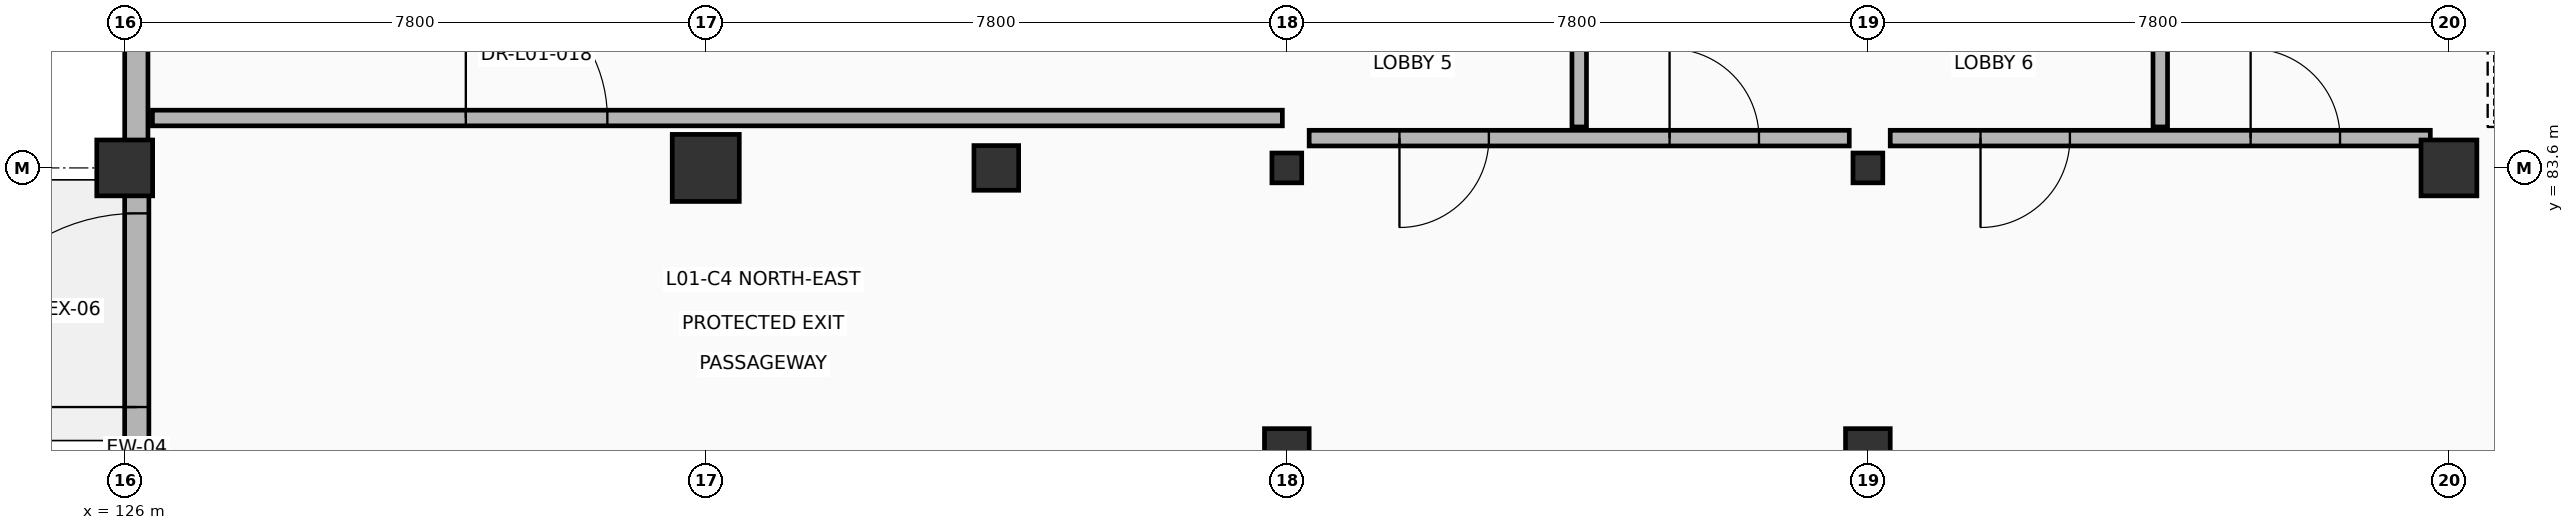
"""IFC4 building model, lengths in metres.
Left out: names, types, materials, properties, quantities, classifications, styles, units other than length and angle.
Written with IfcOpenShell. Run it as: python <this file> out.ifc"""

import sys

from ifc_helpers import new_model, si_unit, direction, frame, frame_2d, origin, origin_2d, place, context, subcontext, project, spatial, rectangle, hollow_rectangle, circle, extrude, element, fill, save


model = new_model("IFC4")
c1 = context("Model", 3, precision=1e-05, world=origin(), true_north=direction((0.0, 1.0)))
c2 = subcontext(c1, "Body", "Model", "MODEL_VIEW")
j1 = project(units=[si_unit("LENGTHUNIT", "METRE"), si_unit("PLANEANGLEUNIT", "RADIAN")], contexts=[c1])
p1 = place(None, origin())
s1 = spatial("IfcSite", under=j1, at=p1, CompositionType="ELEMENT")
p2 = place(p1, origin())
s2 = spatial("IfcBuilding", under=s1, at=p2, CompositionType="ELEMENT")
p3 = place(p2, origin())
s3 = spatial("IfcBuildingStorey", under=s2, at=p3, CompositionType="ELEMENT", Elevation=0.0)
p4 = place(p3, frame((126.0, 83.6, 0.0), z_axis=(0.0, 0.0, 1.0), x_axis=(1.0, 0.0, 0.0)))
e1 = element("IfcColumn", 1, at=p4, inside=s3, PredefinedType="COLUMN", context=c2, shape_type="SweptSolid", body=[
    extrude(circle(Radius=0.375, at=origin_2d()), origin(), (0.0, 0.0, 1.0), 5.1),
])
p5 = place(p3, frame((133.8, 83.6, 0.0), z_axis=(0.0, 0.0, 1.0), x_axis=(1.0, 0.0, 0.0)))
e2 = element("IfcColumn", 2, at=p5, inside=s3, PredefinedType="COLUMN", context=c2, shape_type="SweptSolid", body=[
    extrude(rectangle(XDim=0.9, YDim=0.9, at=origin_2d()), origin(), (0.0, 0.0, 1.0), 5.4),
])
for number, where, z_axis, x_axis in (
    (3, (141.6, 83.6, 0.0), (0.0, 0.0, 1.0), (1.0, 0.0, 0.0)),
    (4, (149.4, 83.6, 0.0), (0.0, 0.0, 1.0), (1.0, 0.0, 0.0)),
):
    element("IfcColumn", number, at=place(p3, frame(where, z_axis=z_axis, x_axis=x_axis)), inside=s3, PredefinedType="COLUMN", context=c2, shape_type="SweptSolid", body=[
        extrude(hollow_rectangle(XDim=0.4, YDim=0.4, WallThickness=0.016, at=origin_2d()), origin(), (0.0, 0.0, 1.0), 5.4),
    ])
p6 = place(p3, frame((157.2, 83.6, 0.0), z_axis=(0.0, 0.0, 1.0), x_axis=(1.0, 0.0, 0.0)))
e5 = element("IfcColumn", 5, at=p6, inside=s3, PredefinedType="COLUMN", context=c2, shape_type="SweptSolid", body=[
    extrude(circle(Radius=0.375, at=origin_2d()), origin(), (0.0, 0.0, 1.0), 5.4),
])
for number, where, z_axis, x_axis in (
    (6, (137.7, 83.6, 0.0), (0.0, 0.0, 1.0), (1.0, 0.0, 0.0)),
    (7, (141.6, 79.8, 0.0), (0.0, 0.0, 1.0), (1.0, 0.0, 0.0)),
    (8, (149.4, 79.8, 0.0), (0.0, 0.0, 1.0), (1.0, 0.0, 0.0)),
):
    element("IfcColumn", number, at=place(p3, frame(where, z_axis=z_axis, x_axis=x_axis)), inside=s3, PredefinedType="COLUMN", context=c2, shape_type="SweptSolid", body=[
        extrude(rectangle(XDim=0.6, YDim=0.6, at=origin_2d()), origin(), (0.0, 0.0, 1.0), 5.4),
    ])
p7 = place(p3, frame((126.162, 76.435, 0.0), z_axis=(0.0, 0.0, 1.0), x_axis=(0.0, 1.0, 0.0)))
e9 = element("IfcWall", 9, at=p7, inside=s3, PredefinedType="SOLIDWALL", context=c2, shape_type="SweptSolid", body=[
    extrude(rectangle(XDim=6.805, YDim=0.325, at=frame_2d((3.402, 0.0))), origin(), (0.0, 0.0, 1.0), 4.402),
])
p8 = place(p7, frame((3.955, 0.0, 0.0)))
e10 = element("IfcOpeningElement", 10, at=p8, cuts=e9, PredefinedType="OPENING", context=c2, shape_type="SweptSolid", body=[
    extrude(rectangle(XDim=2.6, YDim=2.6, at=frame_2d((1.3, 1.3))), frame((0.0, 0.172, 0.0), z_axis=(0.0, -1.0, 0.0), x_axis=(1.0, 0.0, 0.0)), (0.0, 0.0, 1.0), 0.345),
])
p9 = place(p3, frame((126.156, 83.96, 0.0), z_axis=(0.0, 0.0, 1.0), x_axis=(0.0, 1.0, 0.0)))
e11 = element("IfcWall", 11, at=p9, inside=s3, PredefinedType="SOLIDWALL", context=c2, shape_type="SweptSolid", body=[
    extrude(rectangle(XDim=6.805, YDim=0.312, at=frame_2d((3.402, 0.0))), origin(), (0.0, 0.0, 1.0), 4.402),
])
p10 = place(p9, frame((2.103, 0.0, 0.0)))
e12 = element("IfcOpeningElement", 12, at=p10, cuts=e11, PredefinedType="OPENING", context=c2, shape_type="SweptSolid", body=[
    extrude(rectangle(XDim=2.6, YDim=2.6, at=frame_2d((1.3, 1.3))), frame((0.0, 0.166, 0.0), z_axis=(0.0, -1.0, 0.0), x_axis=(1.0, 0.0, 0.0)), (0.0, 0.0, 1.0), 0.332),
])
p11 = place(p3, frame((141.9, 84.0, 0.0), z_axis=(0.0, 0.0, 1.0), x_axis=(1.0, 0.0, 0.0)))
e13 = element("IfcWall", 13, at=p11, inside=s3, PredefinedType="PARTITIONING", context=c2, shape_type="SweptSolid", body=[
    extrude(rectangle(XDim=7.25, YDim=0.21, at=frame_2d((3.625, 0.0))), origin(), (0.0, 0.0, 1.0), 5.1),
])
p12 = place(p11, frame((1.212, 0.0, 0.0)))
e14 = element("IfcOpeningElement", 14, at=p12, cuts=e13, PredefinedType="OPENING", context=c2, shape_type="SweptSolid", body=[
    extrude(rectangle(XDim=1.2, YDim=2.2, at=frame_2d((0.6, 1.1))), frame((0.0, 0.115, 0.0), z_axis=(0.0, -1.0, 0.0), x_axis=(1.0, 0.0, 0.0)), (0.0, 0.0, 1.0), 0.23),
])
p13 = place(p11, frame((4.838, 0.0, 0.0)))
e15 = element("IfcOpeningElement", 15, at=p13, cuts=e13, PredefinedType="OPENING", context=c2, shape_type="SweptSolid", body=[
    extrude(rectangle(XDim=1.2, YDim=2.2, at=frame_2d((0.6, 1.1))), frame((0.0, 0.115, 0.0), z_axis=(0.0, -1.0, 0.0), x_axis=(1.0, 0.0, 0.0)), (0.0, 0.0, 1.0), 0.23),
])
p14 = place(p3, frame((145.525, 84.15, 0.0), z_axis=(0.0, 0.0, 1.0), x_axis=(0.0, 1.0, 0.0)))
e16 = element("IfcWall", 16, at=p14, inside=s3, PredefinedType="PARTITIONING", context=c2, shape_type="SweptSolid", body=[
    extrude(rectangle(XDim=4.1, YDim=0.195, at=frame_2d((2.05, 0.0))), origin(), (0.0, 0.0, 1.0), 5.1),
])
p15 = place(p14, frame((1.5, 0.0, 0.0)))
e17 = element("IfcOpeningElement", 17, at=p15, cuts=e16, PredefinedType="OPENING", context=c2, shape_type="SweptSolid", body=[
    extrude(rectangle(XDim=1.1, YDim=2.15, at=frame_2d((0.55, 1.075))), frame((0.0, 0.107, 0.0), z_axis=(0.0, -1.0, 0.0), x_axis=(1.0, 0.0, 0.0)), (0.0, 0.0, 1.0), 0.215),
])
p16 = place(p3, frame((149.7, 84.0, 0.0), z_axis=(0.0, 0.0, 1.0), x_axis=(1.0, 0.0, 0.0)))
e18 = element("IfcWall", 18, at=p16, inside=s3, PredefinedType="PARTITIONING", context=c2, shape_type="SweptSolid", body=[
    extrude(rectangle(XDim=7.25, YDim=0.21, at=frame_2d((3.625, 0.0))), origin(), (0.0, 0.0, 1.0), 5.1),
])
p17 = place(p16, frame((1.212, 0.0, 0.0)))
e19 = element("IfcOpeningElement", 19, at=p17, cuts=e18, PredefinedType="OPENING", context=c2, shape_type="SweptSolid", body=[
    extrude(rectangle(XDim=1.2, YDim=2.2, at=frame_2d((0.6, 1.1))), frame((0.0, 0.115, 0.0), z_axis=(0.0, -1.0, 0.0), x_axis=(1.0, 0.0, 0.0)), (0.0, 0.0, 1.0), 0.23),
])
p18 = place(p16, frame((4.838, 0.0, 0.0)))
e20 = element("IfcOpeningElement", 20, at=p18, cuts=e18, PredefinedType="OPENING", context=c2, shape_type="SweptSolid", body=[
    extrude(rectangle(XDim=1.2, YDim=2.2, at=frame_2d((0.6, 1.1))), frame((0.0, 0.115, 0.0), z_axis=(0.0, -1.0, 0.0), x_axis=(1.0, 0.0, 0.0)), (0.0, 0.0, 1.0), 0.23),
])
p19 = place(p3, frame((153.325, 84.15, 0.0), z_axis=(0.0, 0.0, 1.0), x_axis=(0.0, 1.0, 0.0)))
e21 = element("IfcWall", 21, at=p19, inside=s3, PredefinedType="PARTITIONING", context=c2, shape_type="SweptSolid", body=[
    extrude(rectangle(XDim=4.1, YDim=0.195, at=frame_2d((2.05, 0.0))), origin(), (0.0, 0.0, 1.0), 5.1),
])
p20 = place(p19, frame((1.5, 0.0, 0.0)))
e22 = element("IfcOpeningElement", 22, at=p20, cuts=e21, PredefinedType="OPENING", context=c2, shape_type="SweptSolid", body=[
    extrude(rectangle(XDim=1.1, YDim=2.15, at=frame_2d((0.55, 1.075))), frame((0.0, 0.107, 0.0), z_axis=(0.0, -1.0, 0.0), x_axis=(1.0, 0.0, 0.0)), (0.0, 0.0, 1.0), 0.215),
])
p21 = place(p3, frame((126.372, 84.27, 0.0), z_axis=(0.0, 0.0, 1.0), x_axis=(1.0, 0.0, 0.0)))
e23 = element("IfcWall", 23, at=p21, inside=s3, PredefinedType="PARTITIONING", context=c2, shape_type="SweptSolid", body=[
    extrude(rectangle(XDim=15.168, YDim=0.21, at=frame_2d((7.584, 0.0))), origin(), (0.0, 0.0, 1.0), 4.402),
])
p22 = place(p21, frame((4.207, 0.0, 0.0)))
e24 = element("IfcOpeningElement", 24, at=p22, cuts=e23, PredefinedType="OPENING", context=c2, shape_type="SweptSolid", body=[
    extrude(rectangle(XDim=1.9, YDim=2.4, at=frame_2d((0.95, 1.2))), frame((0.0, 0.115, 0.0), z_axis=(0.0, -1.0, 0.0), x_axis=(1.0, 0.0, 0.0)), (0.0, 0.0, 1.0), 0.23),
])
p23 = place(p8, origin())
e25 = element("IfcDoor", 25, at=p23, inside=s3, OperationType="DOUBLE_DOOR_SINGLE_SWING", PredefinedType="DOOR", context=c2, shape_type="SweptSolid", body=[
    extrude(rectangle(XDim=2.6, YDim=2.6, at=frame_2d((1.3, 1.3))), frame((0.0, 0.025, 0.0), z_axis=(0.0, -1.0, 0.0), x_axis=(1.0, 0.0, 0.0)), (0.0, 0.0, 1.0), 0.05),
])
fill(e10, e25)
p24 = place(p12, origin())
e26 = element("IfcDoor", 26, at=p24, inside=s3, OperationType="SINGLE_SWING_RIGHT", PredefinedType="DOOR", context=c2, shape_type="SweptSolid", body=[
    extrude(rectangle(XDim=1.2, YDim=2.2, at=frame_2d((0.6, 1.1))), frame((0.0, 0.025, 0.0), z_axis=(0.0, -1.0, 0.0), x_axis=(1.0, 0.0, 0.0)), (0.0, 0.0, 1.0), 0.05),
])
fill(e14, e26)
p25 = place(p13, origin())
e27 = element("IfcDoor", 27, at=p25, inside=s3, OperationType="SINGLE_SWING_LEFT", PredefinedType="DOOR", context=c2, shape_type="SweptSolid", body=[
    extrude(rectangle(XDim=1.2, YDim=2.2, at=frame_2d((0.6, 1.1))), frame((0.0, 0.025, 0.0), z_axis=(0.0, -1.0, 0.0), x_axis=(1.0, 0.0, 0.0)), (0.0, 0.0, 1.0), 0.05),
])
fill(e15, e27)
p26 = place(p17, origin())
e28 = element("IfcDoor", 28, at=p26, inside=s3, OperationType="SINGLE_SWING_RIGHT", PredefinedType="DOOR", context=c2, shape_type="SweptSolid", body=[
    extrude(rectangle(XDim=1.2, YDim=2.2, at=frame_2d((0.6, 1.1))), frame((0.0, 0.025, 0.0), z_axis=(0.0, -1.0, 0.0), x_axis=(1.0, 0.0, 0.0)), (0.0, 0.0, 1.0), 0.05),
])
fill(e19, e28)
p27 = place(p18, origin())
e29 = element("IfcDoor", 29, at=p27, inside=s3, OperationType="SINGLE_SWING_LEFT", PredefinedType="DOOR", context=c2, shape_type="SweptSolid", body=[
    extrude(rectangle(XDim=1.2, YDim=2.2, at=frame_2d((0.6, 1.1))), frame((0.0, 0.025, 0.0), z_axis=(0.0, -1.0, 0.0), x_axis=(1.0, 0.0, 0.0)), (0.0, 0.0, 1.0), 0.05),
])
fill(e20, e29)
p28 = place(p22, origin())
e30 = element("IfcDoor", 30, at=p28, inside=s3, OperationType="DOUBLE_DOOR_SINGLE_SWING", PredefinedType="DOOR", context=c2, shape_type="SweptSolid", body=[
    extrude(rectangle(XDim=1.9, YDim=2.4, at=frame_2d((0.95, 1.2))), frame((0.0, 0.025, 0.0), z_axis=(0.0, -1.0, 0.0), x_axis=(1.0, 0.0, 0.0)), (0.0, 0.0, 1.0), 0.05),
])
fill(e24, e30)
save(model, sys.argv[1])
